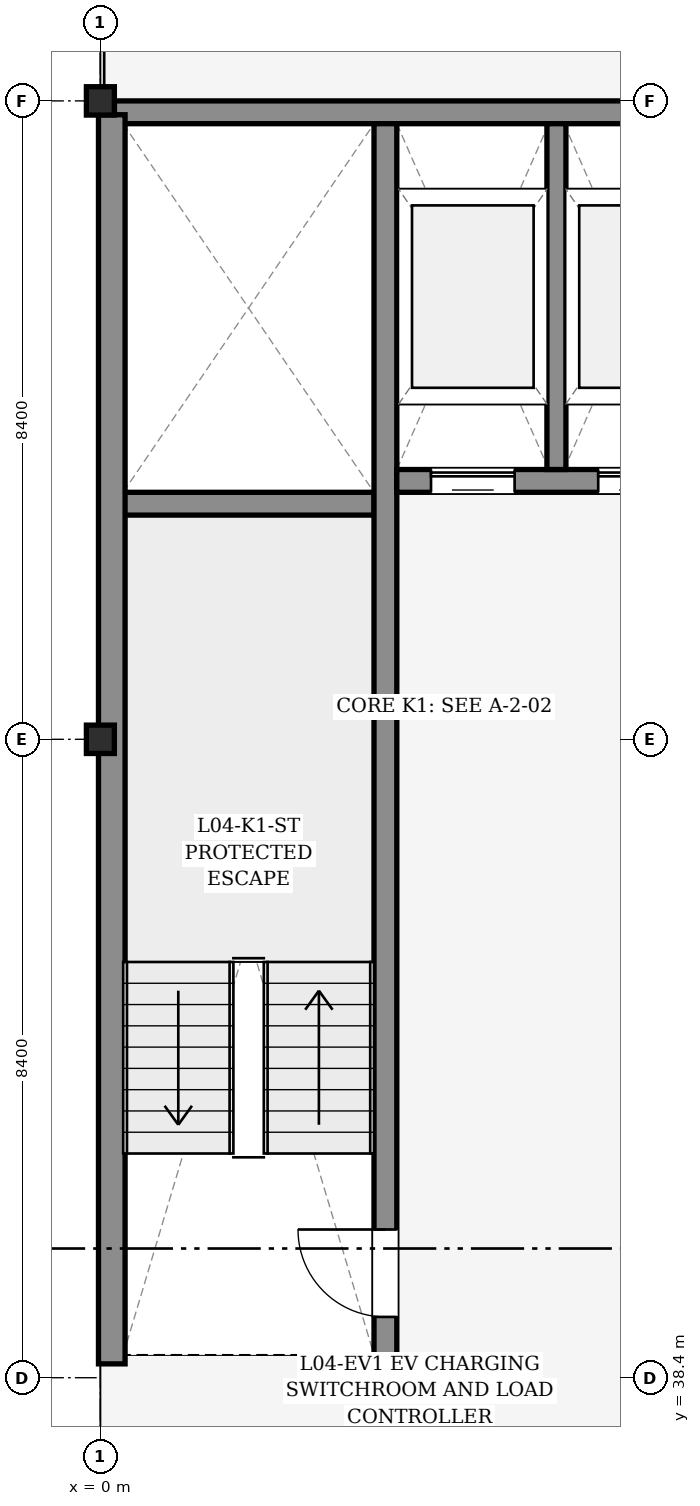
"""IFC4 building model, lengths in metres.
Left out: names, types, materials, properties, quantities, classifications, styles, units other than length and angle.
Written with IfcOpenShell. Run it as: python <this file> out.ifc"""

import sys

from ifc_helpers import new_model, si_unit, direction, frame, frame_2d, origin, origin_2d, place, context, subcontext, project, spatial, rectangle, i_section, extrude, element, fill, save


model = new_model("IFC4")
c1 = context("Model", 3, precision=1e-05, world=origin(), true_north=direction((0.0, 1.0)))
c2 = subcontext(c1, "Body", "Model", "MODEL_VIEW")
j1 = project(units=[si_unit("LENGTHUNIT", "METRE"), si_unit("PLANEANGLEUNIT", "RADIAN")], contexts=[c1])
p1 = place(None, origin())
s1 = spatial("IfcSite", under=j1, at=p1, CompositionType="ELEMENT")
p2 = place(p1, origin())
s2 = spatial("IfcBuilding", under=s1, at=p2, CompositionType="ELEMENT")
p3 = place(p2, frame((0.0, 0.0, 16.2)))
s3 = spatial("IfcBuildingStorey", under=s2, at=p3, CompositionType="ELEMENT", Elevation=16.2)
for number, where, z_axis, x_axis in (
    (1, (0.0, 38.4, 0.0), (0.0, 0.0, 1.0), (1.0, 0.0, 0.0)),
    (2, (0.0, 46.8, 0.0), (0.0, 0.0, 1.0), (1.0, 0.0, 0.0)),
    (3, (0.0, 55.2, 0.0), (0.0, 0.0, 1.0), (1.0, 0.0, 0.0)),
):
    element("IfcColumn", number, at=place(p3, frame(where, z_axis=z_axis, x_axis=x_axis)), inside=s3, PredefinedType="COLUMN", context=c2, shape_type="SweptSolid", body=[
        extrude(i_section(OverallWidth=0.373, OverallDepth=0.368, WebThickness=0.014, FlangeThickness=0.024, FilletRadius=0.015, at=origin_2d()), origin(), (0.0, 0.0, 1.0), 3.6),
    ])
for number, where, z_axis, x_axis in (
    (4, (0.185, 38.55, 0.0), (0.0, 0.0, 1.0), (1.0, 0.0, 0.0)),
    (5, (0.185, 55.05, 0.0), (0.0, 0.0, 1.0), (1.0, 0.0, 0.0)),
):
    element("IfcWall", number, at=place(p3, frame(where, z_axis=z_axis, x_axis=x_axis)), inside=s3, PredefinedType="SHEAR", context=c2, shape_type="SweptSolid", body=[
        extrude(rectangle(XDim=8.031, YDim=0.3, at=frame_2d((4.016, 0.0))), origin(), (0.0, 0.0, 1.0), 3.38),
    ])
p4 = place(p3, frame((0.3, 49.9, 0.0), z_axis=(0.0, 0.0, 1.0), x_axis=(1.0, 0.0, 0.0)))
e6 = element("IfcWall", 6, at=p4, inside=s3, PredefinedType="SHEAR", context=c2, shape_type="SweptSolid", body=[
    extrude(rectangle(XDim=3.3, YDim=0.3, at=frame_2d((1.65, 0.0))), origin(), (0.0, 0.0, 1.0), 3.38),
])
p5 = place(p3, frame((0.15, 38.582, 0.0), z_axis=(0.0, 0.0, 1.0), x_axis=(0.0, 1.0, 0.0)))
e7 = element("IfcWall", 7, at=p5, inside=s3, PredefinedType="SHEAR", context=c2, shape_type="SweptSolid", body=[
    extrude(rectangle(XDim=16.436, YDim=0.35, at=frame_2d((8.218, 0.0))), origin(), (0.0, 0.0, 1.0), 3.38),
])
p6 = place(p3, frame((3.75, 38.7, 0.0), z_axis=(0.0, 0.0, 1.0), x_axis=(0.0, 1.0, 0.0)))
e8 = element("IfcWall", 8, at=p6, inside=s3, PredefinedType="SHEAR", context=c2, shape_type="SweptSolid", body=[
    extrude(rectangle(XDim=16.2, YDim=0.3, at=frame_2d((8.1, 0.0))), origin(), (0.0, 0.0, 1.0), 3.38),
])
p7 = place(p6, frame((0.5, 0.0, 0.0)))
e9 = element("IfcOpeningElement", 9, at=p7, cuts=e8, PredefinedType="OPENING", context=c2, shape_type="SweptSolid", body=[
    extrude(rectangle(XDim=1.15, YDim=2.15, at=frame_2d((0.575, 1.075))), frame((0.0, 0.16, 0.0), z_axis=(0.0, -1.0, 0.0), x_axis=(1.0, 0.0, 0.0)), (0.0, 0.0, 1.0), 0.32),
])
p8 = place(p3, frame((3.9, 50.2, 0.0), z_axis=(0.0, 0.0, 1.0), x_axis=(1.0, 0.0, 0.0)))
e10 = element("IfcWall", 10, at=p8, inside=s3, PredefinedType="SHEAR", context=c2, shape_type="SweptSolid", body=[
    extrude(rectangle(XDim=4.2, YDim=0.3, at=frame_2d((2.1, 0.0))), origin(), (0.0, 0.0, 1.0), 3.38),
])
p9 = place(p8, frame((0.45, 0.0, 0.0)))
e11 = element("IfcOpeningElement", 11, at=p9, cuts=e10, PredefinedType="OPENING", context=c2, shape_type="SweptSolid", body=[
    extrude(rectangle(XDim=1.1, YDim=2.2, at=frame_2d((0.55, 1.1))), frame((0.0, 0.16, 0.0), z_axis=(0.0, -1.0, 0.0), x_axis=(1.0, 0.0, 0.0)), (0.0, 0.0, 1.0), 0.32),
])
p10 = place(p8, frame((2.65, 0.0, 0.0)))
e12 = element("IfcOpeningElement", 12, at=p10, cuts=e10, PredefinedType="OPENING", context=c2, shape_type="SweptSolid", body=[
    extrude(rectangle(XDim=1.1, YDim=2.2, at=frame_2d((0.55, 1.1))), frame((0.0, 0.16, 0.0), z_axis=(0.0, -1.0, 0.0), x_axis=(1.0, 0.0, 0.0)), (0.0, 0.0, 1.0), 0.32),
])
p11 = place(p3, frame((6.0, 50.35, 0.0), z_axis=(0.0, 0.0, 1.0), x_axis=(0.0, 1.0, 0.0)))
e13 = element("IfcWall", 13, at=p11, inside=s3, PredefinedType="PARTITIONING", context=c2, shape_type="SweptSolid", body=[
    extrude(rectangle(XDim=4.55, YDim=0.25, at=frame_2d((2.275, 0.0))), origin(), (0.0, 0.0, 1.0), 2.525),
])
p12 = place(p7, frame((1.15, 0.0, 0.0), z_axis=(0.0, 0.0, 1.0), x_axis=(-1.0, 0.0, 0.0)))
e14 = element("IfcDoor", 14, at=p12, inside=s3, OperationType="SINGLE_SWING_LEFT", PredefinedType="DOOR", context=c2, shape_type="SweptSolid", body=[
    extrude(rectangle(XDim=1.15, YDim=2.15, at=frame_2d((0.575, 1.075))), frame((0.0, 0.025, 0.0), z_axis=(0.0, -1.0, 0.0), x_axis=(1.0, 0.0, 0.0)), (0.0, 0.0, 1.0), 0.05),
])
fill(e9, e14)
p13 = place(p9, origin())
e15 = element("IfcDoor", 15, at=p13, inside=s3, OperationType="SLIDING_TO_LEFT", PredefinedType="DOOR", context=c2, shape_type="SweptSolid", body=[
    extrude(rectangle(XDim=1.1, YDim=2.2, at=frame_2d((0.55, 1.1))), frame((0.0, 0.025, 0.0), z_axis=(0.0, -1.0, 0.0), x_axis=(1.0, 0.0, 0.0)), (0.0, 0.0, 1.0), 0.05),
])
fill(e11, e15)
p14 = place(p10, origin())
e16 = element("IfcDoor", 16, at=p14, inside=s3, OperationType="SLIDING_TO_LEFT", PredefinedType="DOOR", context=c2, shape_type="SweptSolid", body=[
    extrude(rectangle(XDim=1.1, YDim=2.2, at=frame_2d((0.55, 1.1))), frame((0.0, 0.025, 0.0), z_axis=(0.0, -1.0, 0.0), x_axis=(1.0, 0.0, 0.0)), (0.0, 0.0, 1.0), 0.05),
])
fill(e12, e16)
save(model, sys.argv[1])
